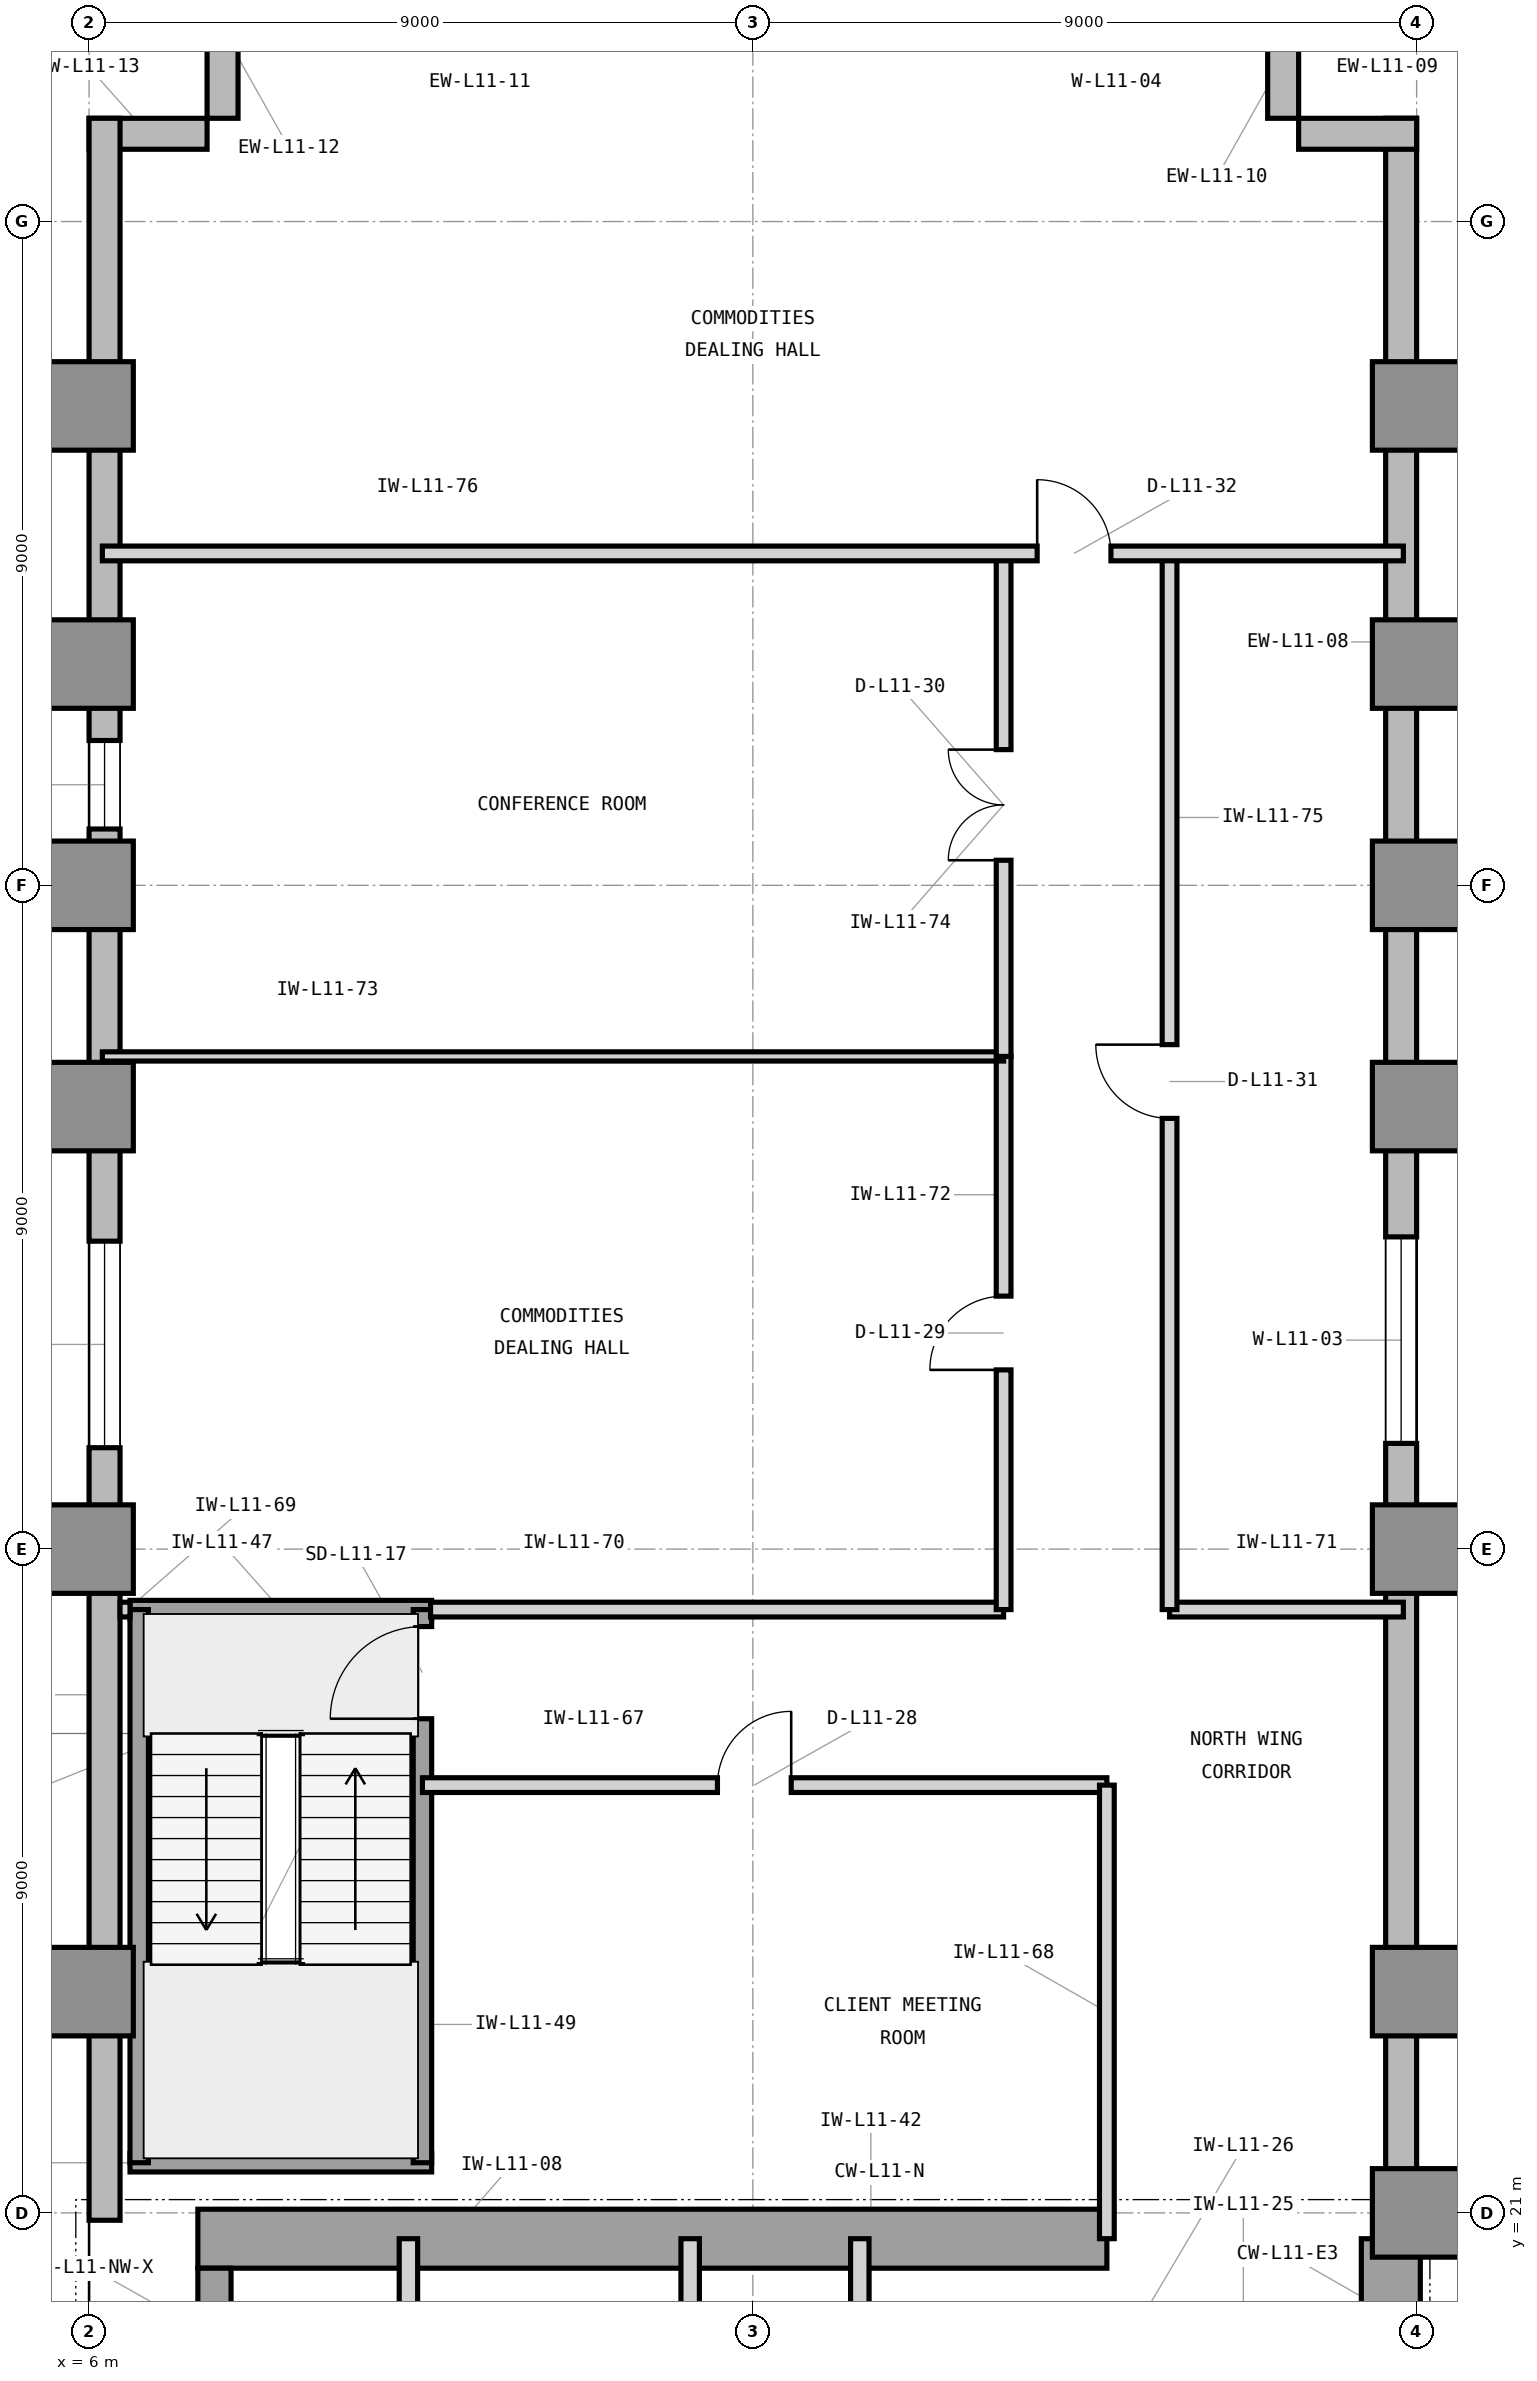
"""IFC4 building model, lengths in metres.
Left out: names, types, materials, properties, quantities, classifications, styles, units other than length and angle.
Written with IfcOpenShell. Run it as: python <this file> out.ifc"""

import sys

from ifc_helpers import new_model, si_unit, direction, frame, frame_2d, origin, origin_2d, place, context, subcontext, project, spatial, rectangle, extrude, element, fill, save


model = new_model("IFC4")
c1 = context("Model", 3, precision=1e-05, world=origin(), true_north=direction((0.0, 1.0)))
c2 = subcontext(c1, "Body", "Model", "MODEL_VIEW")
j1 = project(units=[si_unit("LENGTHUNIT", "METRE"), si_unit("PLANEANGLEUNIT", "RADIAN")], contexts=[c1])
p1 = place(None, origin())
s1 = spatial("IfcSite", under=j1, at=p1, CompositionType="ELEMENT")
p2 = place(p1, origin())
s2 = spatial("IfcBuilding", under=s1, at=p2, CompositionType="ELEMENT")
p3 = place(p2, frame((0.0, 0.0, 51.0)))
s3 = spatial("IfcBuildingStorey", under=s2, at=p3, CompositionType="ELEMENT", Elevation=51.0)
p4 = place(p3, frame((7.475, 20.65, 0.0), z_axis=(0.0, 0.0, 1.0), x_axis=(1.0, 0.0, 0.0)))
e1 = element("IfcWall", 1, at=p4, inside=s3, PredefinedType="SHEAR", context=c2, shape_type="SweptSolid", body=[
    extrude(rectangle(XDim=12.325, YDim=0.8, at=frame_2d((6.163, 0.0))), origin(), (0.0, 0.0, 1.0), 4.2),
])
p5 = place(p3, frame((23.65, 16.6, 0.0), z_axis=(0.0, 0.0, 1.0), x_axis=(0.0, 1.0, 0.0)))
e2 = element("IfcWall", 2, at=p5, inside=s3, PredefinedType="SHEAR", context=c2, shape_type="SweptSolid", body=[
    extrude(rectangle(XDim=4.05, YDim=0.8, at=frame_2d((2.025, 0.0))), origin(), (0.0, 0.0, 1.0), 4.2),
])
p6 = place(p3, frame((7.7, 19.575, 0.0), z_axis=(0.0, 0.0, 1.0), x_axis=(0.0, 1.0, 0.0)))
e3 = element("IfcWall", 3, at=p6, inside=s3, PredefinedType="SHEAR", context=c2, shape_type="SweptSolid", body=[
    extrude(rectangle(XDim=0.675, YDim=0.45, at=frame_2d((0.337, 0.0))), origin(), (0.0, 0.0, 1.0), 4.2),
])
for number, where, z_axis, x_axis in (
    (4, (24.0, 21.0, 0.0), (0.0, 0.0, 1.0), (1.0, 0.0, 0.0)),
    (5, (6.0, 24.0, 0.0), (0.0, 0.0, 1.0), (1.0, 0.0, 0.0)),
    (6, (24.0, 24.0, 0.0), (0.0, 0.0, 1.0), (1.0, 0.0, 0.0)),
    (7, (6.0, 30.0, 0.0), (0.0, 0.0, 1.0), (1.0, 0.0, 0.0)),
    (8, (24.0, 30.0, 0.0), (0.0, 0.0, 1.0), (1.0, 0.0, 0.0)),
    (9, (6.0, 36.0, 0.0), (0.0, 0.0, 1.0), (1.0, 0.0, 0.0)),
    (10, (24.0, 36.0, 0.0), (0.0, 0.0, 1.0), (1.0, 0.0, 0.0)),
    (11, (6.0, 39.0, 0.0), (0.0, 0.0, 1.0), (1.0, 0.0, 0.0)),
    (12, (24.0, 39.0, 0.0), (0.0, 0.0, 1.0), (1.0, 0.0, 0.0)),
    (13, (6.0, 42.0, 0.0), (0.0, 0.0, 1.0), (1.0, 0.0, 0.0)),
    (14, (24.0, 42.0, 0.0), (0.0, 0.0, 1.0), (1.0, 0.0, 0.0)),
    (15, (6.0, 45.5, 0.0), (0.0, 0.0, 1.0), (1.0, 0.0, 0.0)),
    (16, (24.0, 45.5, 0.0), (0.0, 0.0, 1.0), (1.0, 0.0, 0.0)),
):
    element("IfcColumn", number, at=place(p3, frame(where, z_axis=z_axis, x_axis=x_axis)), inside=s3, PredefinedType="COLUMN", context=c2, shape_type="SweptSolid", body=[
        extrude(rectangle(XDim=1.2, YDim=1.2, at=origin_2d()), origin(), (0.0, 0.0, 1.0), 4.2),
    ])
p7 = place(p3, frame((23.79, 21.0, 0.0), z_axis=(0.0, 0.0, 1.0), x_axis=(0.0, 1.0, 0.0)))
e17 = element("IfcWall", 17, at=p7, inside=s3, PredefinedType="STANDARD", context=c2, shape_type="SweptSolid", body=[
    extrude(rectangle(XDim=28.4, YDim=0.42, at=frame_2d((14.2, 0.0))), origin(), (0.0, 0.0, 1.0), 3.98),
])
p8 = place(p7, frame((10.433, 0.0, 0.85)))
e18 = element("IfcOpeningElement", 18, at=p8, cuts=e17, PredefinedType="OPENING", context=c2, shape_type="SweptSolid", body=[
    extrude(rectangle(XDim=2.8, YDim=2.45, at=frame_2d((1.4, 1.225))), frame((0.0, 0.22, 0.0), z_axis=(0.0, -1.0, 0.0), x_axis=(1.0, 0.0, 0.0)), (0.0, 0.0, 1.0), 0.44),
])
for number, where, z_axis, x_axis in (
    (19, (24.0, 49.19, 0.0), (0.0, 0.0, 1.0), (-1.0, 0.0, 0.0)),
    (20, (22.19, 49.4, 0.0), (0.0, 0.0, 1.0), (0.0, 1.0, 0.0)),
    (21, (7.81, 51.0, 0.0), (0.0, 0.0, 1.0), (0.0, -1.0, 0.0)),
    (22, (7.6, 49.19, 0.0), (0.0, 0.0, 1.0), (-1.0, 0.0, 0.0)),
):
    element("IfcWall", number, at=place(p3, frame(where, z_axis=z_axis, x_axis=x_axis)), inside=s3, PredefinedType="STANDARD", context=c2, shape_type="SweptSolid", body=[
        extrude(rectangle(XDim=1.6, YDim=0.42, at=frame_2d((0.8, 0.0))), origin(), (0.0, 0.0, 1.0), 3.98),
    ])
p9 = place(p3, frame((6.21, 49.4, 0.0), z_axis=(0.0, 0.0, 1.0), x_axis=(0.0, -1.0, 0.0)))
e23 = element("IfcWall", 23, at=p9, inside=s3, PredefinedType="STANDARD", context=c2, shape_type="SweptSolid", body=[
    extrude(rectangle(XDim=28.5, YDim=0.42, at=frame_2d((14.25, 0.0))), origin(), (0.0, 0.0, 1.0), 3.98),
])
p10 = place(p9, frame((15.225, 0.0, 0.85)))
e24 = element("IfcOpeningElement", 24, at=p10, cuts=e23, PredefinedType="OPENING", context=c2, shape_type="SweptSolid", body=[
    extrude(rectangle(XDim=2.8, YDim=2.45, at=frame_2d((1.4, 1.225))), frame((0.0, 0.22, 0.0), z_axis=(0.0, -1.0, 0.0), x_axis=(1.0, 0.0, 0.0)), (0.0, 0.0, 1.0), 0.44),
])
p11 = place(p9, frame((8.436, 0.0, 0.85)))
e25 = element("IfcOpeningElement", 25, at=p11, cuts=e23, PredefinedType="OPENING", context=c2, shape_type="SweptSolid", body=[
    extrude(rectangle(XDim=1.2, YDim=2.45, at=frame_2d((0.6, 1.225))), frame((0.0, 0.22, 0.0), z_axis=(0.0, -1.0, 0.0), x_axis=(1.0, 0.0, 0.0)), (0.0, 0.0, 1.0), 0.44),
])
p12 = place(p3, frame((10.33, 19.45, 0.0), z_axis=(0.0, 0.0, 1.0), x_axis=(0.0, 1.0, 0.0)))
e26 = element("IfcWall", 26, at=p12, inside=s3, PredefinedType="PARTITIONING", context=c2, shape_type="SweptSolid", body=[
    extrude(rectangle(XDim=1.2, YDim=0.25, at=frame_2d((0.6, 0.0))), origin(), (0.0, 0.0, 1.0), 3.114),
])
for number, where, z_axis, x_axis in (
    (27, (14.15, 16.7, 0.0), (0.0, 0.0, 1.0), (0.0, 1.0, 0.0)),
    (28, (16.45, 16.7, 0.0), (0.0, 0.0, 1.0), (0.0, 1.0, 0.0)),
):
    element("IfcWall", number, at=place(p3, frame(where, z_axis=z_axis, x_axis=x_axis)), inside=s3, PredefinedType="PARTITIONING", context=c2, shape_type="SweptSolid", body=[
        extrude(rectangle(XDim=3.95, YDim=0.25, at=frame_2d((1.975, 0.0))), origin(), (0.0, 0.0, 1.0), 3.97),
    ])
for number, where, z_axis, x_axis in (
    (29, (6.555, 21.68, 0.0), (0.0, 0.0, 1.0), (1.0, 0.0, 0.0)),
    (30, (6.555, 29.18, 0.0), (0.0, 0.0, 1.0), (1.0, 0.0, 0.0)),
):
    element("IfcWall", number, at=place(p3, frame(where, z_axis=z_axis, x_axis=x_axis)), inside=s3, PredefinedType="SHEAR", context=c2, shape_type="SweptSolid", body=[
        extrude(rectangle(XDim=4.09, YDim=0.25, at=frame_2d((2.045, 0.0))), origin(), (0.0, 0.0, 1.0), 4.2),
    ])
p13 = place(p3, frame((6.68, 21.68, 0.0), z_axis=(0.0, 0.0, 1.0), x_axis=(0.0, 1.0, 0.0)))
e31 = element("IfcWall", 31, at=p13, inside=s3, PredefinedType="SHEAR", context=c2, shape_type="SweptSolid", body=[
    extrude(rectangle(XDim=7.5, YDim=0.25, at=frame_2d((3.75, 0.0))), origin(), (0.0, 0.0, 1.0), 4.2),
])
p14 = place(p3, frame((10.52, 21.68, 0.0), z_axis=(0.0, 0.0, 1.0), x_axis=(0.0, 1.0, 0.0)))
e32 = element("IfcWall", 32, at=p14, inside=s3, PredefinedType="SHEAR", context=c2, shape_type="SweptSolid", body=[
    extrude(rectangle(XDim=7.5, YDim=0.25, at=frame_2d((3.75, 0.0))), origin(), (0.0, 0.0, 1.0), 4.2),
])
p15 = place(p14, frame((6.02, 0.0, 0.0)))
e33 = element("IfcOpeningElement", 33, at=p15, cuts=e32, PredefinedType="OPENING", context=c2, shape_type="SweptSolid", body=[
    extrude(rectangle(XDim=1.25, YDim=2.2, at=frame_2d((0.625, 1.1))), frame((0.0, 0.135, 0.0), z_axis=(0.0, -1.0, 0.0), x_axis=(1.0, 0.0, 0.0)), (0.0, 0.0, 1.0), 0.27),
])
p16 = place(p3, frame((10.52, 26.8, 0.0), z_axis=(0.0, 0.0, 1.0), x_axis=(1.0, 0.0, 0.0)))
e34 = element("IfcWall", 34, at=p16, inside=s3, PredefinedType="PARTITIONING", context=c2, shape_type="SweptSolid", body=[
    extrude(rectangle(XDim=9.28, YDim=0.2, at=frame_2d((4.64, 0.0))), origin(), (0.0, 0.0, 1.0), 3.97),
])
p17 = place(p16, frame((4.0, 0.0, 0.0)))
e35 = element("IfcOpeningElement", 35, at=p17, cuts=e34, PredefinedType="OPENING", context=c2, shape_type="SweptSolid", body=[
    extrude(rectangle(XDim=1.0, YDim=2.15, at=frame_2d((0.5, 1.075))), frame((0.0, 0.11, 0.0), z_axis=(0.0, -1.0, 0.0), x_axis=(1.0, 0.0, 0.0)), (0.0, 0.0, 1.0), 0.22),
])
p18 = place(p3, frame((19.8, 20.65, 0.0), z_axis=(0.0, 0.0, 1.0), x_axis=(0.0, 1.0, 0.0)))
e36 = element("IfcWall", 36, at=p18, inside=s3, PredefinedType="PARTITIONING", context=c2, shape_type="SweptSolid", body=[
    extrude(rectangle(XDim=6.15, YDim=0.2, at=frame_2d((3.075, 0.0))), origin(), (0.0, 0.0, 1.0), 3.97),
])
p19 = place(p3, frame((6.42, 29.18, 0.0), z_axis=(0.0, 0.0, 1.0), x_axis=(1.0, 0.0, 0.0)))
e37 = element("IfcWall", 37, at=p19, inside=s3, PredefinedType="PARTITIONING", context=c2, shape_type="SweptSolid", body=[
    extrude(rectangle(XDim=0.135, YDim=0.2, at=frame_2d((0.067, 0.0))), origin(), (0.0, 0.0, 1.0), 3.97),
])
p20 = place(p3, frame((10.63, 29.18, 0.0), z_axis=(0.0, 0.0, 1.0), x_axis=(1.0, 0.0, 0.0)))
e38 = element("IfcWall", 38, at=p20, inside=s3, PredefinedType="PARTITIONING", context=c2, shape_type="SweptSolid", body=[
    extrude(rectangle(XDim=7.77, YDim=0.2, at=frame_2d((3.885, 0.0))), origin(), (0.0, 0.0, 1.0), 3.97),
])
p21 = place(p3, frame((20.65, 29.18, 0.0), z_axis=(0.0, 0.0, 1.0), x_axis=(1.0, 0.0, 0.0)))
e39 = element("IfcWall", 39, at=p21, inside=s3, PredefinedType="PARTITIONING", context=c2, shape_type="SweptSolid", body=[
    extrude(rectangle(XDim=3.17, YDim=0.2, at=frame_2d((1.585, 0.0))), origin(), (0.0, 0.0, 1.0), 3.97),
])
p22 = place(p3, frame((18.4, 29.18, 0.0), z_axis=(0.0, 0.0, 1.0), x_axis=(0.0, 1.0, 0.0)))
e40 = element("IfcWall", 40, at=p22, inside=s3, PredefinedType="PARTITIONING", context=c2, shape_type="SweptSolid", body=[
    extrude(rectangle(XDim=7.5, YDim=0.2, at=frame_2d((3.75, 0.0))), origin(), (0.0, 0.0, 1.0), 3.97),
])
p23 = place(p22, frame((3.25, 0.0, 0.0)))
e41 = element("IfcOpeningElement", 41, at=p23, cuts=e40, PredefinedType="OPENING", context=c2, shape_type="SweptSolid", body=[
    extrude(rectangle(XDim=1.0, YDim=2.15, at=frame_2d((0.5, 1.075))), frame((0.0, 0.11, 0.0), z_axis=(0.0, -1.0, 0.0), x_axis=(1.0, 0.0, 0.0)), (0.0, 0.0, 1.0), 0.22),
])
p24 = place(p3, frame((6.18, 36.68, 0.0), z_axis=(0.0, 0.0, 1.0), x_axis=(1.0, 0.0, 0.0)))
e42 = element("IfcWall", 42, at=p24, inside=s3, PredefinedType="PARTITIONING", context=c2, shape_type="SweptSolid", body=[
    extrude(rectangle(XDim=12.22, YDim=0.125, at=frame_2d((6.11, 0.0))), origin(), (0.0, 0.0, 1.0), 3.97),
])
p25 = place(p3, frame((18.4, 36.68, 0.0), z_axis=(0.0, 0.0, 1.0), x_axis=(0.0, 1.0, 0.0)))
e43 = element("IfcWall", 43, at=p25, inside=s3, PredefinedType="PARTITIONING", context=c2, shape_type="SweptSolid", body=[
    extrude(rectangle(XDim=6.82, YDim=0.2, at=frame_2d((3.41, 0.0))), origin(), (0.0, 0.0, 1.0), 3.97),
])
p26 = place(p25, frame((2.66, 0.0, 0.0)))
e44 = element("IfcOpeningElement", 44, at=p26, cuts=e43, PredefinedType="OPENING", context=c2, shape_type="SweptSolid", body=[
    extrude(rectangle(XDim=1.5, YDim=2.3, at=frame_2d((0.75, 1.15))), frame((0.0, 0.11, 0.0), z_axis=(0.0, -1.0, 0.0), x_axis=(1.0, 0.0, 0.0)), (0.0, 0.0, 1.0), 0.22),
])
p27 = place(p3, frame((20.65, 29.18, 0.0), z_axis=(0.0, 0.0, 1.0), x_axis=(0.0, 1.0, 0.0)))
e45 = element("IfcWall", 45, at=p27, inside=s3, PredefinedType="PARTITIONING", context=c2, shape_type="SweptSolid", body=[
    extrude(rectangle(XDim=14.32, YDim=0.2, at=frame_2d((7.16, 0.0))), origin(), (0.0, 0.0, 1.0), 3.97),
])
p28 = place(p27, frame((6.66, 0.0, 0.0)))
e46 = element("IfcOpeningElement", 46, at=p28, cuts=e45, PredefinedType="OPENING", context=c2, shape_type="SweptSolid", body=[
    extrude(rectangle(XDim=1.0, YDim=2.15, at=frame_2d((0.5, 1.075))), frame((0.0, 0.11, 0.0), z_axis=(0.0, -1.0, 0.0), x_axis=(1.0, 0.0, 0.0)), (0.0, 0.0, 1.0), 0.22),
])
p29 = place(p3, frame((6.18, 43.5, 0.0), z_axis=(0.0, 0.0, 1.0), x_axis=(1.0, 0.0, 0.0)))
e47 = element("IfcWall", 47, at=p29, inside=s3, PredefinedType="PARTITIONING", context=c2, shape_type="SweptSolid", body=[
    extrude(rectangle(XDim=17.64, YDim=0.2, at=frame_2d((8.82, 0.0))), origin(), (0.0, 0.0, 1.0), 3.97),
])
p30 = place(p29, frame((12.675, 0.0, 0.0)))
e48 = element("IfcOpeningElement", 48, at=p30, cuts=e47, PredefinedType="OPENING", context=c2, shape_type="SweptSolid", body=[
    extrude(rectangle(XDim=1.0, YDim=2.15, at=frame_2d((0.5, 1.075))), frame((0.0, 0.11, 0.0), z_axis=(0.0, -1.0, 0.0), x_axis=(1.0, 0.0, 0.0)), (0.0, 0.0, 1.0), 0.22),
])
p31 = place(p8, origin())
e49 = element("IfcWindow", 49, at=p31, inside=s3, PartitioningType="SINGLE_PANEL", PredefinedType="WINDOW", context=c2, shape_type="SweptSolid", body=[
    extrude(rectangle(XDim=2.8, YDim=2.45, at=frame_2d((1.4, 1.225))), frame((0.0, 0.11, 0.0), z_axis=(0.0, -1.0, 0.0), x_axis=(1.0, 0.0, 0.0)), (0.0, 0.0, 1.0), 0.06),
])
fill(e18, e49)
p32 = place(p10, origin())
e50 = element("IfcWindow", 50, at=p32, inside=s3, PartitioningType="SINGLE_PANEL", PredefinedType="WINDOW", context=c2, shape_type="SweptSolid", body=[
    extrude(rectangle(XDim=2.8, YDim=2.45, at=frame_2d((1.4, 1.225))), frame((0.0, 0.11, 0.0), z_axis=(0.0, -1.0, 0.0), x_axis=(1.0, 0.0, 0.0)), (0.0, 0.0, 1.0), 0.06),
])
fill(e24, e50)
p33 = place(p15, origin())
e51 = element("IfcDoor", 51, at=p33, inside=s3, OperationType="SINGLE_SWING_LEFT", PredefinedType="DOOR", context=c2, shape_type="SweptSolid", body=[
    extrude(rectangle(XDim=1.25, YDim=2.2, at=frame_2d((0.625, 1.1))), frame((0.0, 0.025, 0.0), z_axis=(0.0, -1.0, 0.0), x_axis=(1.0, 0.0, 0.0)), (0.0, 0.0, 1.0), 0.05),
])
fill(e33, e51)
p34 = place(p17, origin())
e52 = element("IfcDoor", 52, at=p34, inside=s3, OperationType="SINGLE_SWING_RIGHT", PredefinedType="DOOR", context=c2, shape_type="SweptSolid", body=[
    extrude(rectangle(XDim=1.0, YDim=2.15, at=frame_2d((0.5, 1.075))), frame((0.0, 0.025, 0.0), z_axis=(0.0, -1.0, 0.0), x_axis=(1.0, 0.0, 0.0)), (0.0, 0.0, 1.0), 0.05),
])
fill(e35, e52)
p35 = place(p23, origin())
e53 = element("IfcDoor", 53, at=p35, inside=s3, OperationType="SINGLE_SWING_LEFT", PredefinedType="DOOR", context=c2, shape_type="SweptSolid", body=[
    extrude(rectangle(XDim=1.0, YDim=2.15, at=frame_2d((0.5, 1.075))), frame((0.0, 0.025, 0.0), z_axis=(0.0, -1.0, 0.0), x_axis=(1.0, 0.0, 0.0)), (0.0, 0.0, 1.0), 0.05),
])
fill(e41, e53)
p36 = place(p26, origin())
e54 = element("IfcDoor", 54, at=p36, inside=s3, OperationType="DOUBLE_DOOR_SINGLE_SWING", PredefinedType="DOOR", context=c2, shape_type="SweptSolid", body=[
    extrude(rectangle(XDim=1.5, YDim=2.3, at=frame_2d((0.75, 1.15))), frame((0.0, 0.025, 0.0), z_axis=(0.0, -1.0, 0.0), x_axis=(1.0, 0.0, 0.0)), (0.0, 0.0, 1.0), 0.05),
])
fill(e44, e54)
p37 = place(p28, origin())
e55 = element("IfcDoor", 55, at=p37, inside=s3, OperationType="SINGLE_SWING_RIGHT", PredefinedType="DOOR", context=c2, shape_type="SweptSolid", body=[
    extrude(rectangle(XDim=1.0, YDim=2.15, at=frame_2d((0.5, 1.075))), frame((0.0, 0.025, 0.0), z_axis=(0.0, -1.0, 0.0), x_axis=(1.0, 0.0, 0.0)), (0.0, 0.0, 1.0), 0.05),
])
fill(e46, e55)
p38 = place(p30, origin())
e56 = element("IfcDoor", 56, at=p38, inside=s3, OperationType="SINGLE_SWING_LEFT", PredefinedType="DOOR", context=c2, shape_type="SweptSolid", body=[
    extrude(rectangle(XDim=1.0, YDim=2.15, at=frame_2d((0.5, 1.075))), frame((0.0, 0.025, 0.0), z_axis=(0.0, -1.0, 0.0), x_axis=(1.0, 0.0, 0.0)), (0.0, 0.0, 1.0), 0.05),
])
fill(e48, e56)
p39 = place(p11, origin())
e57 = element("IfcWindow", 57, at=p39, inside=s3, PartitioningType="SINGLE_PANEL", PredefinedType="WINDOW", context=c2, shape_type="SweptSolid", body=[
    extrude(rectangle(XDim=1.2, YDim=2.45, at=frame_2d((0.6, 1.225))), frame((0.0, 0.11, 0.0), z_axis=(0.0, -1.0, 0.0), x_axis=(1.0, 0.0, 0.0)), (0.0, 0.0, 1.0), 0.06),
])
fill(e25, e57)
save(model, sys.argv[1])
